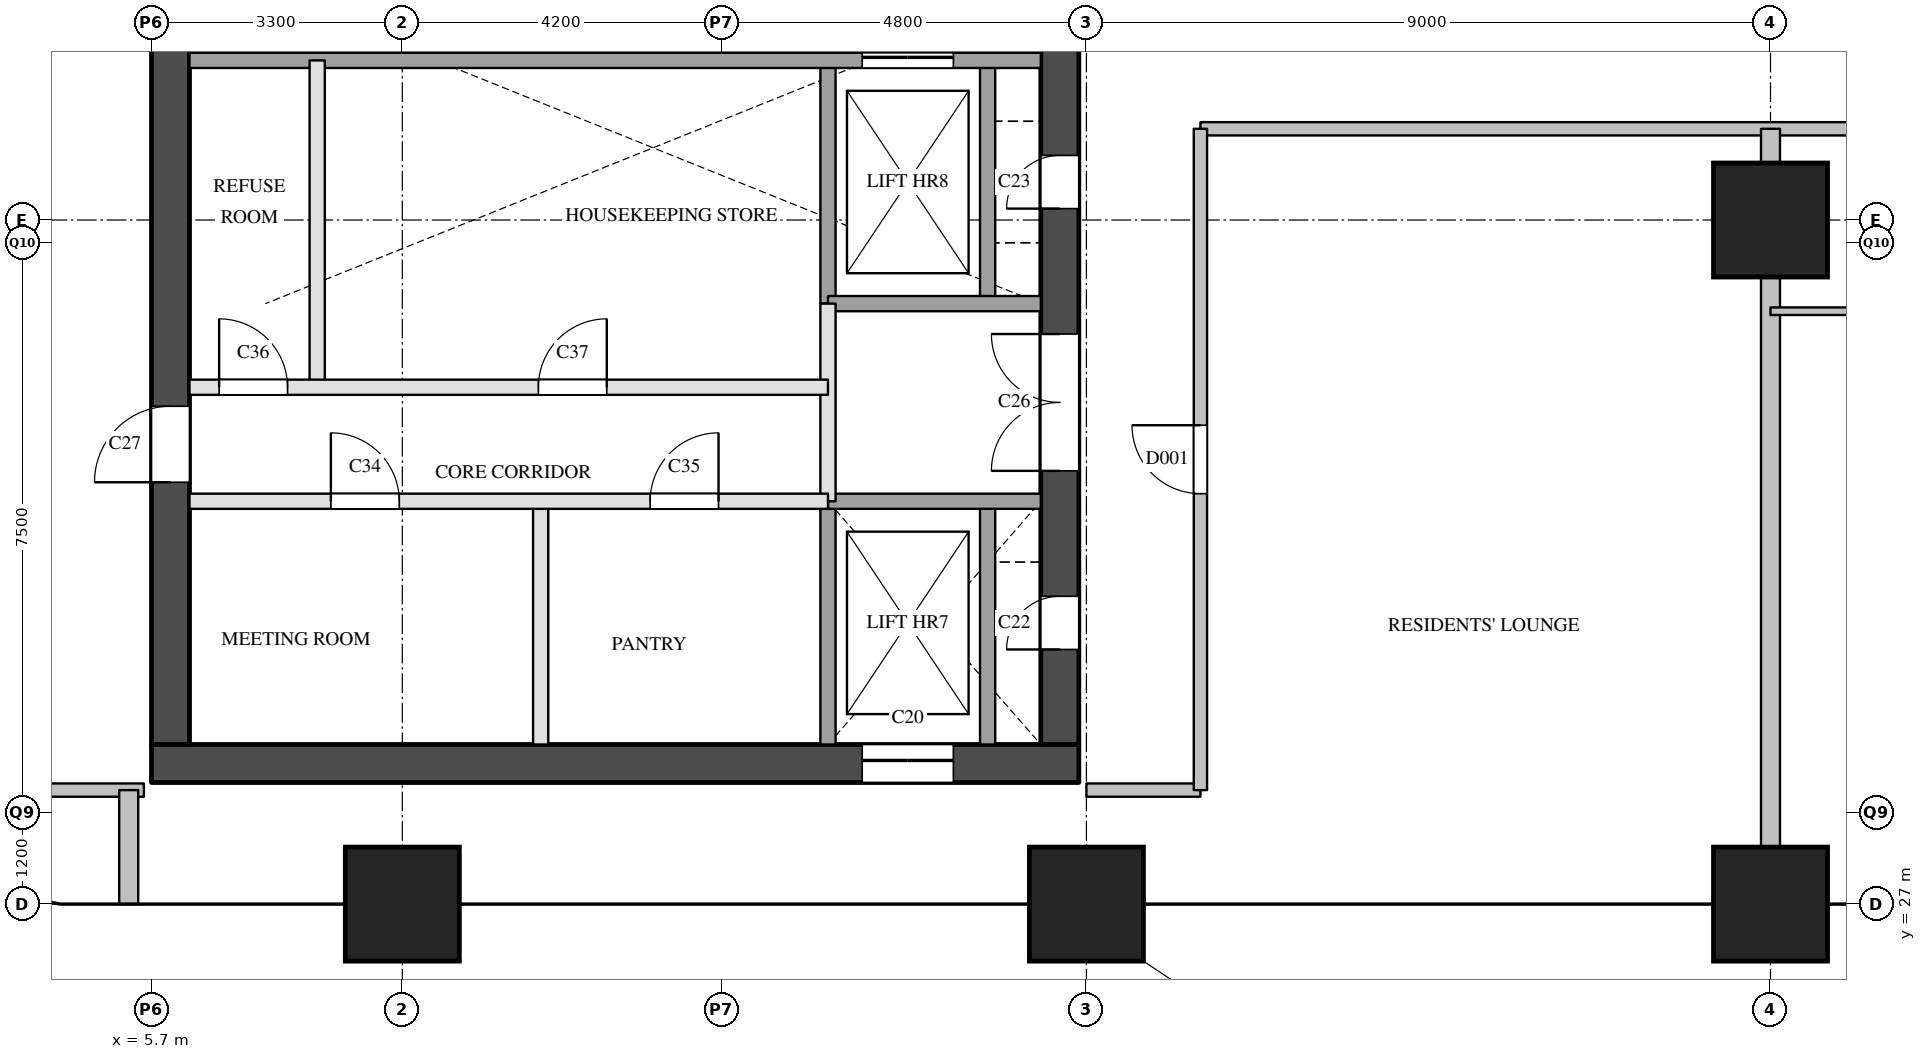
"""IFC4 building model, lengths in metres.
Left out: names, types, materials, properties, quantities, classifications, styles, units other than length and angle.
Written with IfcOpenShell. Run it as: python <this file> out.ifc"""

import sys

from ifc_helpers import new_model, si_unit, direction, frame, frame_2d, origin, origin_2d, place, context, subcontext, project, spatial, rectangle, extrude, element, fill, save


model = new_model("IFC4")
c1 = context("Model", 3, precision=1e-05, world=origin(), true_north=direction((0.0, 1.0)))
c2 = subcontext(c1, "Body", "Model", "MODEL_VIEW")
j1 = project(units=[si_unit("LENGTHUNIT", "METRE"), si_unit("PLANEANGLEUNIT", "RADIAN")], contexts=[c1])
p1 = place(None, origin())
s1 = spatial("IfcSite", under=j1, at=p1, CompositionType="ELEMENT")
p2 = place(p1, origin())
s2 = spatial("IfcBuilding", under=s1, at=p2, CompositionType="ELEMENT")
p3 = place(p2, frame((0.0, 0.0, 189.5)))
s3 = spatial("IfcBuildingStorey", under=s2, at=p3, CompositionType="ELEMENT", Elevation=189.5)
for number, where, z_axis, x_axis in (
    (1, (9.0, 27.0, 0.0), (0.0, 0.0, 1.0), (1.0, 0.0, 0.0)),
    (2, (18.0, 27.0, 0.0), (0.0, 0.0, 1.0), (1.0, 0.0, 0.0)),
    (3, (27.0, 27.0, 0.0), (0.0, 0.0, 1.0), (1.0, 0.0, 0.0)),
    (4, (27.0, 36.0, 0.0), (0.0, 0.0, 1.0), (1.0, 0.0, 0.0)),
):
    element("IfcColumn", number, at=place(p3, frame(where, z_axis=z_axis, x_axis=x_axis)), inside=s3, PredefinedType="COLUMN", context=c2, shape_type="SweptSolid", body=[
        extrude(rectangle(XDim=1.5, YDim=1.5, at=origin_2d()), origin(), (0.0, 0.0, 1.0), 3.9),
    ])
p4 = place(p3, frame((5.7, 28.85, 0.0), z_axis=(0.0, 0.0, 1.0), x_axis=(1.0, 0.0, 0.0)))
e5 = element("IfcWall", 5, at=p4, inside=s3, PredefinedType="SHEAR", context=c2, shape_type="SweptSolid", body=[
    extrude(rectangle(XDim=12.2, YDim=0.5, at=frame_2d((6.1, 0.0))), origin(), (0.0, 0.0, 1.0), 3.6),
])
p5 = place(p4, frame((9.35, 0.0, 0.0)))
e6 = element("IfcOpeningElement", 6, at=p5, cuts=e5, PredefinedType="OPENING", context=c2, shape_type="SweptSolid", body=[
    extrude(rectangle(XDim=1.2, YDim=2.1, at=frame_2d((0.6, 1.05))), frame((0.0, 0.26, 0.0), z_axis=(0.0, -1.0, 0.0), x_axis=(1.0, 0.0, 0.0)), (0.0, 0.0, 1.0), 0.52),
])
p6 = place(p3, frame((5.95, 29.1, 0.0), z_axis=(0.0, 0.0, 1.0), x_axis=(0.0, 1.0, 0.0)))
e7 = element("IfcWall", 7, at=p6, inside=s3, PredefinedType="SHEAR", context=c2, shape_type="SweptSolid", body=[
    extrude(rectangle(XDim=20.3, YDim=0.5, at=frame_2d((10.15, 0.0))), origin(), (0.0, 0.0, 1.0), 3.6),
])
p7 = place(p6, frame((3.45, 0.0, 0.0)))
e8 = element("IfcOpeningElement", 8, at=p7, cuts=e7, PredefinedType="OPENING", context=c2, shape_type="SweptSolid", body=[
    extrude(rectangle(XDim=1.0, YDim=2.1, at=frame_2d((0.5, 1.05))), frame((0.0, 0.26, 0.0), z_axis=(0.0, -1.0, 0.0), x_axis=(1.0, 0.0, 0.0)), (0.0, 0.0, 1.0), 0.52),
])
p8 = place(p6, frame((16.4, 0.0, 0.0)))
e9 = element("IfcOpeningElement", 9, at=p8, cuts=e7, PredefinedType="OPENING", context=c2, shape_type="SweptSolid", body=[
    extrude(rectangle(XDim=1.0, YDim=2.1, at=frame_2d((0.5, 1.05))), frame((0.0, 0.26, 0.0), z_axis=(0.0, -1.0, 0.0), x_axis=(1.0, 0.0, 0.0)), (0.0, 0.0, 1.0), 0.52),
])
p9 = place(p3, frame((17.65, 29.1, 0.0), z_axis=(0.0, 0.0, 1.0), x_axis=(0.0, 1.0, 0.0)))
e10 = element("IfcWall", 10, at=p9, inside=s3, PredefinedType="SHEAR", context=c2, shape_type="SweptSolid", body=[
    extrude(rectangle(XDim=20.3, YDim=0.5, at=frame_2d((10.15, 0.0))), origin(), (0.0, 0.0, 1.0), 3.6),
])
p10 = place(p9, frame((1.25, 0.0, 0.0)))
e11 = element("IfcOpeningElement", 11, at=p10, cuts=e10, PredefinedType="OPENING", context=c2, shape_type="SweptSolid", body=[
    extrude(rectangle(XDim=0.7, YDim=2.1, at=frame_2d((0.35, 1.05))), frame((0.0, 0.26, 0.0), z_axis=(0.0, -1.0, 0.0), x_axis=(1.0, 0.0, 0.0)), (0.0, 0.0, 1.0), 0.52),
])
p11 = place(p9, frame((7.05, 0.0, 0.0)))
e12 = element("IfcOpeningElement", 12, at=p11, cuts=e10, PredefinedType="OPENING", context=c2, shape_type="SweptSolid", body=[
    extrude(rectangle(XDim=0.7, YDim=2.1, at=frame_2d((0.35, 1.05))), frame((0.0, 0.26, 0.0), z_axis=(0.0, -1.0, 0.0), x_axis=(1.0, 0.0, 0.0)), (0.0, 0.0, 1.0), 0.52),
])
p12 = place(p9, frame((3.6, 0.0, 0.0)))
e13 = element("IfcOpeningElement", 13, at=p12, cuts=e10, PredefinedType="OPENING", context=c2, shape_type="SweptSolid", body=[
    extrude(rectangle(XDim=1.8, YDim=2.1, at=frame_2d((0.9, 1.05))), frame((0.0, 0.26, 0.0), z_axis=(0.0, -1.0, 0.0), x_axis=(1.0, 0.0, 0.0)), (0.0, 0.0, 1.0), 0.52),
])
p13 = place(p3, frame((7.88, 33.8, 0.0), z_axis=(0.0, 0.0, 1.0), x_axis=(0.0, 1.0, 0.0)))
e14 = element("IfcWall", 14, at=p13, inside=s3, PredefinedType="PARTITIONING", context=c2, shape_type="SweptSolid", body=[
    extrude(rectangle(XDim=4.3, YDim=0.2, at=frame_2d((2.15, 0.0))), origin(), (0.0, 0.0, 1.0), 3.6),
])
p14 = place(p3, frame((10.82, 29.1, 0.0), z_axis=(0.0, 0.0, 1.0), x_axis=(0.0, 1.0, 0.0)))
e15 = element("IfcWall", 15, at=p14, inside=s3, PredefinedType="PARTITIONING", context=c2, shape_type="SweptSolid", body=[
    extrude(rectangle(XDim=3.2, YDim=0.2, at=frame_2d((1.6, 0.0))), origin(), (0.0, 0.0, 1.0), 3.6),
])
p15 = place(p3, frame((14.6, 32.3, 0.0), z_axis=(0.0, 0.0, 1.0), x_axis=(0.0, 1.0, 0.0)))
e16 = element("IfcWall", 16, at=p15, inside=s3, PredefinedType="PARTITIONING", context=c2, shape_type="SweptSolid", body=[
    extrude(rectangle(XDim=2.6, YDim=0.2, at=frame_2d((1.3, 0.0))), origin(), (0.0, 0.0, 1.0), 3.6),
])
p16 = place(p3, frame((14.6, 29.1, 0.0), z_axis=(0.0, 0.0, 1.0), x_axis=(0.0, 1.0, 0.0)))
e17 = element("IfcWall", 17, at=p16, inside=s3, PredefinedType="SOLIDWALL", context=c2, shape_type="SweptSolid", body=[
    extrude(rectangle(XDim=3.2, YDim=0.2, at=frame_2d((1.6, 0.0))), origin(), (0.0, 0.0, 1.0), 3.6),
])
p17 = place(p3, frame((14.6, 34.9, 0.0), z_axis=(0.0, 0.0, 1.0), x_axis=(0.0, 1.0, 0.0)))
e18 = element("IfcWall", 18, at=p17, inside=s3, PredefinedType="SOLIDWALL", context=c2, shape_type="SweptSolid", body=[
    extrude(rectangle(XDim=3.2, YDim=0.2, at=frame_2d((1.6, 0.0))), origin(), (0.0, 0.0, 1.0), 3.6),
])
p18 = place(p3, frame((16.7, 29.1, 0.0), z_axis=(0.0, 0.0, 1.0), x_axis=(0.0, 1.0, 0.0)))
e19 = element("IfcWall", 19, at=p18, inside=s3, PredefinedType="SOLIDWALL", context=c2, shape_type="SweptSolid", body=[
    extrude(rectangle(XDim=3.2, YDim=0.2, at=frame_2d((1.6, 0.0))), origin(), (0.0, 0.0, 1.0), 3.6),
])
p19 = place(p3, frame((16.7, 34.9, 0.0), z_axis=(0.0, 0.0, 1.0), x_axis=(0.0, 1.0, 0.0)))
e20 = element("IfcWall", 20, at=p19, inside=s3, PredefinedType="SOLIDWALL", context=c2, shape_type="SweptSolid", body=[
    extrude(rectangle(XDim=3.2, YDim=0.2, at=frame_2d((1.6, 0.0))), origin(), (0.0, 0.0, 1.0), 3.6),
])
p20 = place(p3, frame((6.2, 32.3, 0.0), z_axis=(0.0, 0.0, 1.0), x_axis=(1.0, 0.0, 0.0)))
e21 = element("IfcWall", 21, at=p20, inside=s3, PredefinedType="PARTITIONING", context=c2, shape_type="SweptSolid", body=[
    extrude(rectangle(XDim=8.4, YDim=0.2, at=frame_2d((4.2, 0.0))), origin(), (0.0, 0.0, 1.0), 3.6),
])
p21 = place(p20, frame((1.86, 0.0, 0.0)))
e22 = element("IfcOpeningElement", 22, at=p21, cuts=e21, PredefinedType="OPENING", context=c2, shape_type="SweptSolid", body=[
    extrude(rectangle(XDim=0.9, YDim=2.1, at=frame_2d((0.45, 1.05))), frame((0.0, 0.11, 0.0), z_axis=(0.0, -1.0, 0.0), x_axis=(1.0, 0.0, 0.0)), (0.0, 0.0, 1.0), 0.22),
])
p22 = place(p20, frame((6.06, 0.0, 0.0)))
e23 = element("IfcOpeningElement", 23, at=p22, cuts=e21, PredefinedType="OPENING", context=c2, shape_type="SweptSolid", body=[
    extrude(rectangle(XDim=0.9, YDim=2.1, at=frame_2d((0.45, 1.05))), frame((0.0, 0.11, 0.0), z_axis=(0.0, -1.0, 0.0), x_axis=(1.0, 0.0, 0.0)), (0.0, 0.0, 1.0), 0.22),
])
p23 = place(p3, frame((14.6, 32.3, 0.0), z_axis=(0.0, 0.0, 1.0), x_axis=(1.0, 0.0, 0.0)))
e24 = element("IfcWall", 24, at=p23, inside=s3, PredefinedType="SOLIDWALL", context=c2, shape_type="SweptSolid", body=[
    extrude(rectangle(XDim=2.8, YDim=0.2, at=frame_2d((1.4, 0.0))), origin(), (0.0, 0.0, 1.0), 3.6),
])
p24 = place(p3, frame((6.2, 33.8, 0.0), z_axis=(0.0, 0.0, 1.0), x_axis=(1.0, 0.0, 0.0)))
e25 = element("IfcWall", 25, at=p24, inside=s3, PredefinedType="PARTITIONING", context=c2, shape_type="SweptSolid", body=[
    extrude(rectangle(XDim=8.4, YDim=0.2, at=frame_2d((4.2, 0.0))), origin(), (0.0, 0.0, 1.0), 3.6),
])
p25 = place(p24, frame((0.39, 0.0, 0.0)))
e26 = element("IfcOpeningElement", 26, at=p25, cuts=e25, PredefinedType="OPENING", context=c2, shape_type="SweptSolid", body=[
    extrude(rectangle(XDim=0.9, YDim=2.1, at=frame_2d((0.45, 1.05))), frame((0.0, 0.11, 0.0), z_axis=(0.0, -1.0, 0.0), x_axis=(1.0, 0.0, 0.0)), (0.0, 0.0, 1.0), 0.22),
])
p26 = place(p24, frame((4.59, 0.0, 0.0)))
e27 = element("IfcOpeningElement", 27, at=p26, cuts=e25, PredefinedType="OPENING", context=c2, shape_type="SweptSolid", body=[
    extrude(rectangle(XDim=0.9, YDim=2.1, at=frame_2d((0.45, 1.05))), frame((0.0, 0.11, 0.0), z_axis=(0.0, -1.0, 0.0), x_axis=(1.0, 0.0, 0.0)), (0.0, 0.0, 1.0), 0.22),
])
p27 = place(p3, frame((14.6, 34.9, 0.0), z_axis=(0.0, 0.0, 1.0), x_axis=(1.0, 0.0, 0.0)))
e28 = element("IfcWall", 28, at=p27, inside=s3, PredefinedType="SOLIDWALL", context=c2, shape_type="SweptSolid", body=[
    extrude(rectangle(XDim=2.8, YDim=0.2, at=frame_2d((1.4, 0.0))), origin(), (0.0, 0.0, 1.0), 3.6),
])
p28 = place(p3, frame((6.2, 38.1, 0.0), z_axis=(0.0, 0.0, 1.0), x_axis=(1.0, 0.0, 0.0)))
e29 = element("IfcWall", 29, at=p28, inside=s3, PredefinedType="SOLIDWALL", context=c2, shape_type="SweptSolid", body=[
    extrude(rectangle(XDim=11.2, YDim=0.2, at=frame_2d((5.6, 0.0))), origin(), (0.0, 0.0, 1.0), 3.6),
])
p29 = place(p28, frame((8.85, 0.0, 0.0)))
e30 = element("IfcOpeningElement", 30, at=p29, cuts=e29, PredefinedType="OPENING", context=c2, shape_type="SweptSolid", body=[
    extrude(rectangle(XDim=1.2, YDim=2.1, at=frame_2d((0.6, 1.05))), frame((0.0, 0.11, 0.0), z_axis=(0.0, -1.0, 0.0), x_axis=(1.0, 0.0, 0.0)), (0.0, 0.0, 1.0), 0.22),
])
for number, where, z_axis, x_axis in (
    (31, (4.1, 28.5, 0.0), (0.0, 0.0, 1.0), (1.0, 0.0, 0.0)),
    (32, (18.0, 28.5, 0.0), (0.0, 0.0, 1.0), (1.0, 0.0, 0.0)),
):
    element("IfcWall", number, at=place(p3, frame(where, z_axis=z_axis, x_axis=x_axis)), inside=s3, PredefinedType="PARTITIONING", context=c2, shape_type="SweptSolid", body=[
        extrude(rectangle(XDim=1.5, YDim=0.175, at=frame_2d((0.75, 0.0))), origin(), (0.0, 0.0, 1.0), 3.6),
    ])
p30 = place(p3, frame((19.5, 37.2, 0.0), z_axis=(0.0, 0.0, 1.0), x_axis=(1.0, 0.0, 0.0)))
e33 = element("IfcWall", 33, at=p30, inside=s3, PredefinedType="PARTITIONING", context=c2, shape_type="SweptSolid", body=[
    extrude(rectangle(XDim=15.0, YDim=0.175, at=frame_2d((7.5, 0.0))), origin(), (0.0, 0.0, 1.0), 2.6),
])
p31 = place(p30, frame((11.5, 0.0, 0.0)))
e34 = element("IfcOpeningElement", 34, at=p31, cuts=e33, PredefinedType="OPENING", context=c2, shape_type="SweptSolid", body=[
    extrude(rectangle(XDim=1.0, YDim=2.1, at=frame_2d((0.5, 1.05))), frame((0.0, 0.097, 0.0), z_axis=(0.0, -1.0, 0.0), x_axis=(1.0, 0.0, 0.0)), (0.0, 0.0, 1.0), 0.195),
])
p32 = place(p3, frame((19.5, 28.5, 0.0), z_axis=(0.0, 0.0, 1.0), x_axis=(0.0, 1.0, 0.0)))
e35 = element("IfcWall", 35, at=p32, inside=s3, PredefinedType="PARTITIONING", context=c2, shape_type="SweptSolid", body=[
    extrude(rectangle(XDim=8.7, YDim=0.175, at=frame_2d((4.35, 0.0))), origin(), (0.0, 0.0, 1.0), 3.6),
])
p33 = place(p32, frame((3.9, 0.0, 0.0)))
e36 = element("IfcOpeningElement", 36, at=p33, cuts=e35, PredefinedType="OPENING", context=c2, shape_type="SweptSolid", body=[
    extrude(rectangle(XDim=0.9, YDim=2.1, at=frame_2d((0.45, 1.05))), frame((0.0, 0.097, 0.0), z_axis=(0.0, -1.0, 0.0), x_axis=(1.0, 0.0, 0.0)), (0.0, 0.0, 1.0), 0.195),
])
p34 = place(p3, frame((5.4, 27.0, 0.0), z_axis=(0.0, 0.0, 1.0), x_axis=(0.0, 1.0, 0.0)))
e37 = element("IfcWall", 37, at=p34, inside=s3, PredefinedType="PARTITIONING", context=c2, shape_type="SweptSolid", body=[
    extrude(rectangle(XDim=1.5, YDim=0.25, at=frame_2d((0.75, 0.0))), origin(), (0.0, 0.0, 1.0), 2.6),
])
p35 = place(p3, frame((27.0, 27.0, 0.0), z_axis=(0.0, 0.0, 1.0), x_axis=(0.0, 1.0, 0.0)))
e38 = element("IfcWall", 38, at=p35, inside=s3, PredefinedType="PARTITIONING", context=c2, shape_type="SweptSolid", body=[
    extrude(rectangle(XDim=10.2, YDim=0.25, at=frame_2d((5.1, 0.0))), origin(), (0.0, 0.0, 1.0), 2.6),
])
p36 = place(p3, frame((27.0, 34.8, 0.0), z_axis=(0.0, 0.0, 1.0), x_axis=(1.0, 0.0, 0.0)))
e39 = element("IfcWall", 39, at=p36, inside=s3, PredefinedType="PARTITIONING", context=c2, shape_type="SweptSolid", body=[
    extrude(rectangle(XDim=3.6, YDim=0.1, at=frame_2d((1.8, 0.0))), origin(), (0.0, 0.0, 1.0), 2.6),
])
p37 = place(p36, frame((1.4, 0.0, 0.0)))
e40 = element("IfcOpeningElement", 40, at=p37, cuts=e39, PredefinedType="OPENING", context=c2, shape_type="SweptSolid", body=[
    extrude(rectangle(XDim=0.8, YDim=2.1, at=frame_2d((0.4, 1.05))), frame((0.0, 0.06, 0.0), z_axis=(0.0, -1.0, 0.0), x_axis=(1.0, 0.0, 0.0)), (0.0, 0.0, 1.0), 0.12),
])
p38 = place(p5, origin())
e41 = element("IfcDoor", 41, at=p38, inside=s3, OperationType="SLIDING_TO_LEFT", PredefinedType="DOOR", context=c2, shape_type="SweptSolid", body=[
    extrude(rectangle(XDim=1.2, YDim=2.1, at=frame_2d((0.6, 1.05))), frame((0.0, 0.025, 0.0), z_axis=(0.0, -1.0, 0.0), x_axis=(1.0, 0.0, 0.0)), (0.0, 0.0, 1.0), 0.05),
])
fill(e6, e41)
p39 = place(p29, origin())
e42 = element("IfcDoor", 42, at=p39, inside=s3, OperationType="SLIDING_TO_LEFT", PredefinedType="DOOR", context=c2, shape_type="SweptSolid", body=[
    extrude(rectangle(XDim=1.2, YDim=2.1, at=frame_2d((0.6, 1.05))), frame((0.0, 0.025, 0.0), z_axis=(0.0, -1.0, 0.0), x_axis=(1.0, 0.0, 0.0)), (0.0, 0.0, 1.0), 0.05),
])
fill(e30, e42)
p40 = place(p10, origin())
e43 = element("IfcDoor", 43, at=p40, inside=s3, OperationType="SINGLE_SWING_LEFT", PredefinedType="DOOR", context=c2, shape_type="SweptSolid", body=[
    extrude(rectangle(XDim=0.7, YDim=2.1, at=frame_2d((0.35, 1.05))), frame((0.0, 0.025, 0.0), z_axis=(0.0, -1.0, 0.0), x_axis=(1.0, 0.0, 0.0)), (0.0, 0.0, 1.0), 0.05),
])
fill(e11, e43)
p41 = place(p11, origin())
e44 = element("IfcDoor", 44, at=p41, inside=s3, OperationType="SINGLE_SWING_LEFT", PredefinedType="DOOR", context=c2, shape_type="SweptSolid", body=[
    extrude(rectangle(XDim=0.7, YDim=2.1, at=frame_2d((0.35, 1.05))), frame((0.0, 0.025, 0.0), z_axis=(0.0, -1.0, 0.0), x_axis=(1.0, 0.0, 0.0)), (0.0, 0.0, 1.0), 0.05),
])
fill(e12, e44)
p42 = place(p12, origin())
e45 = element("IfcDoor", 45, at=p42, inside=s3, OperationType="DOUBLE_DOOR_SINGLE_SWING", PredefinedType="DOOR", context=c2, shape_type="SweptSolid", body=[
    extrude(rectangle(XDim=1.8, YDim=2.1, at=frame_2d((0.9, 1.05))), frame((0.0, 0.025, 0.0), z_axis=(0.0, -1.0, 0.0), x_axis=(1.0, 0.0, 0.0)), (0.0, 0.0, 1.0), 0.05),
])
fill(e13, e45)
p43 = place(p7, origin())
e46 = element("IfcDoor", 46, at=p43, inside=s3, OperationType="SINGLE_SWING_LEFT", PredefinedType="DOOR", context=c2, shape_type="SweptSolid", body=[
    extrude(rectangle(XDim=1.0, YDim=2.1, at=frame_2d((0.5, 1.05))), frame((0.0, 0.025, 0.0), z_axis=(0.0, -1.0, 0.0), x_axis=(1.0, 0.0, 0.0)), (0.0, 0.0, 1.0), 0.05),
])
fill(e8, e46)
p44 = place(p21, origin())
e47 = element("IfcDoor", 47, at=p44, inside=s3, OperationType="SINGLE_SWING_LEFT", PredefinedType="DOOR", context=c2, shape_type="SweptSolid", body=[
    extrude(rectangle(XDim=0.9, YDim=2.1, at=frame_2d((0.45, 1.05))), frame((0.0, 0.025, 0.0), z_axis=(0.0, -1.0, 0.0), x_axis=(1.0, 0.0, 0.0)), (0.0, 0.0, 1.0), 0.05),
])
fill(e22, e47)
p45 = place(p22, origin())
e48 = element("IfcDoor", 48, at=p45, inside=s3, OperationType="SINGLE_SWING_RIGHT", PredefinedType="DOOR", context=c2, shape_type="SweptSolid", body=[
    extrude(rectangle(XDim=0.9, YDim=2.1, at=frame_2d((0.45, 1.05))), frame((0.0, 0.025, 0.0), z_axis=(0.0, -1.0, 0.0), x_axis=(1.0, 0.0, 0.0)), (0.0, 0.0, 1.0), 0.05),
])
fill(e23, e48)
p46 = place(p25, origin())
e49 = element("IfcDoor", 49, at=p46, inside=s3, OperationType="SINGLE_SWING_LEFT", PredefinedType="DOOR", context=c2, shape_type="SweptSolid", body=[
    extrude(rectangle(XDim=0.9, YDim=2.1, at=frame_2d((0.45, 1.05))), frame((0.0, 0.025, 0.0), z_axis=(0.0, -1.0, 0.0), x_axis=(1.0, 0.0, 0.0)), (0.0, 0.0, 1.0), 0.05),
])
fill(e26, e49)
p47 = place(p26, origin())
e50 = element("IfcDoor", 50, at=p47, inside=s3, OperationType="SINGLE_SWING_RIGHT", PredefinedType="DOOR", context=c2, shape_type="SweptSolid", body=[
    extrude(rectangle(XDim=0.9, YDim=2.1, at=frame_2d((0.45, 1.05))), frame((0.0, 0.025, 0.0), z_axis=(0.0, -1.0, 0.0), x_axis=(1.0, 0.0, 0.0)), (0.0, 0.0, 1.0), 0.05),
])
fill(e27, e50)
p48 = place(p33, origin())
e51 = element("IfcDoor", 51, at=p48, inside=s3, OperationType="SINGLE_SWING_RIGHT", PredefinedType="DOOR", context=c2, shape_type="SweptSolid", body=[
    extrude(rectangle(XDim=0.9, YDim=2.1, at=frame_2d((0.45, 1.05))), frame((0.0, 0.025, 0.0), z_axis=(0.0, -1.0, 0.0), x_axis=(1.0, 0.0, 0.0)), (0.0, 0.0, 1.0), 0.05),
])
fill(e36, e51)
save(model, sys.argv[1])
